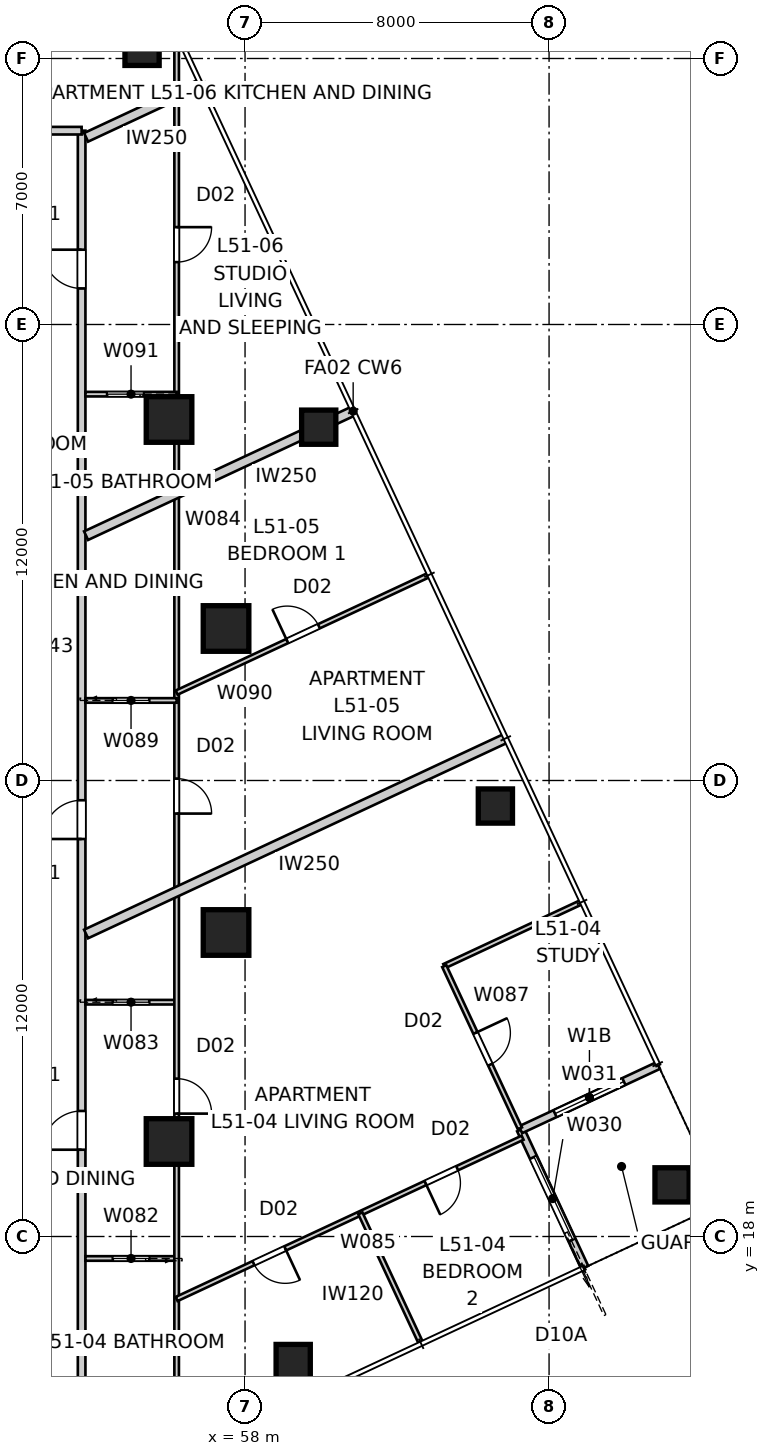
"""IFC4 building model, lengths in metres.
Left out: names, types, materials, properties, quantities, classifications, styles, units other than length and angle.
Written with IfcOpenShell. Run it as: python <this file> out.ifc"""

import sys

from ifc_helpers import new_model, si_unit, direction, frame, frame_2d, origin, origin_2d, place, context, subcontext, project, spatial, rectangle, extrude, element, fill, save


model = new_model("IFC4")
c1 = context("Model", 3, precision=1e-05, world=origin(), true_north=direction((0.0, 1.0)))
c2 = subcontext(c1, "Body", "Model", "MODEL_VIEW")
j1 = project(units=[si_unit("LENGTHUNIT", "METRE"), si_unit("PLANEANGLEUNIT", "RADIAN")], contexts=[c1])
p1 = place(None, origin())
s1 = spatial("IfcSite", under=j1, at=p1, CompositionType="ELEMENT")
p2 = place(p1, origin())
s2 = spatial("IfcBuilding", under=s1, at=p2, CompositionType="ELEMENT")
p3 = place(p2, frame((0.0, 0.0, 186.2)))
s3 = spatial("IfcBuildingStorey", under=s2, at=p3, CompositionType="ELEMENT", Elevation=186.2)
for number, where, z_axis, x_axis in (
    (1, (59.267, 14.71, 0.0), (0.0, 0.0, 1.0), (1.0, 0.0, 0.0)),
    (2, (69.236, 19.359, 0.0), (0.0, 0.0, 1.0), (1.0, 0.0, 0.0)),
    (3, (64.588, 29.328, 0.0), (0.0, 0.0, 1.0), (1.0, 0.0, 0.0)),
    (4, (59.939, 39.298, 0.0), (0.0, 0.0, 1.0), (1.0, 0.0, 0.0)),
    (5, (55.29, 49.267, 0.0), (0.0, 0.0, 1.0), (1.0, 0.0, 0.0)),
):
    element("IfcColumn", number, at=place(p3, frame(where, z_axis=z_axis, x_axis=x_axis)), inside=s3, PredefinedType="COLUMN", context=c2, shape_type="SweptSolid", body=[
        extrude(rectangle(XDim=0.9, YDim=0.9, at=origin_2d()), origin(), (0.0, 0.0, 1.0), 3.4),
    ])
for number, where, z_axis, x_axis in (
    (6, (57.5, 26.0, 0.0), (0.0, 0.0, 1.0), (1.0, 0.0, 0.0)),
    (7, (57.5, 34.0, 0.0), (0.0, 0.0, 1.0), (1.0, 0.0, 0.0)),
    (8, (56.0, 39.5, 0.0), (0.0, 0.0, 1.0), (1.0, 0.0, 0.0)),
    (9, (56.0, 20.5, 0.0), (0.0, 0.0, 1.0), (1.0, 0.0, 0.0)),
):
    element("IfcColumn", number, at=place(p3, frame(where, z_axis=z_axis, x_axis=x_axis)), inside=s3, PredefinedType="COLUMN", context=c2, shape_type="SweptSolid", body=[
        extrude(rectangle(XDim=1.2, YDim=1.2, at=origin_2d()), origin(), (0.0, 0.0, 1.0), 3.4),
    ])
p4 = place(p3, frame((66.94, 17.185, 0.0), z_axis=(0.0, 0.0, 1.0), x_axis=(-0.422658246362, 0.906289140828, 0.0)))
e10 = element("IfcWall", 10, at=p4, inside=s3, PredefinedType="SOLIDWALL", context=c2, shape_type="SweptSolid", body=[
    extrude(rectangle(XDim=4.0, YDim=0.2, at=frame_2d((2.0, 0.0))), origin(), (0.0, 0.0, 1.0), 3.25),
])
p5 = place(p4, frame((0.8, 0.0, 0.0)))
e11 = element("IfcOpeningElement", 11, at=p5, cuts=e10, PredefinedType="OPENING", context=c2, shape_type="SweptSolid", body=[
    extrude(rectangle(XDim=2.4, YDim=2.1, at=frame_2d((1.2, 1.05))), frame((0.0, 0.11, 0.0), z_axis=(0.0, -1.0, 0.0), x_axis=(1.0, 0.0, 0.0)), (0.0, 0.0, 1.0), 0.22),
])
p6 = place(p3, frame((65.25, 20.81, 0.0), z_axis=(0.0, 0.0, 1.0), x_axis=(0.906289140828, 0.422658246362, 0.0)))
e12 = element("IfcWall", 12, at=p6, inside=s3, PredefinedType="SOLIDWALL", context=c2, shape_type="SweptSolid", body=[
    extrude(rectangle(XDim=4.0, YDim=0.2, at=frame_2d((2.0, 0.0))), origin(), (0.0, 0.0, 1.0), 3.25),
])
p7 = place(p6, frame((1.0, 0.0, 0.45)))
e13 = element("IfcOpeningElement", 13, at=p7, cuts=e12, PredefinedType="OPENING", context=c2, shape_type="SweptSolid", body=[
    extrude(rectangle(XDim=2.0, YDim=1.8, at=frame_2d((1.0, 0.9))), frame((0.0, 0.11, 0.0), z_axis=(0.0, -1.0, 0.0), x_axis=(1.0, 0.0, 0.0)), (0.0, 0.0, 1.0), 0.22),
])
p8 = place(p3, frame((53.7, 13.3, 0.0), z_axis=(0.0, 0.0, 1.0), x_axis=(0.0, 1.0, 0.0)))
e14 = element("IfcWall", 14, at=p8, inside=s3, PredefinedType="PARTITIONING", context=c2, shape_type="SweptSolid", body=[
    extrude(rectangle(XDim=33.8, YDim=0.2, at=frame_2d((16.9, 0.0))), origin(), (0.0, 0.0, 1.0), 3.25),
])
p9 = place(p8, frame((6.984, 0.0, 0.0)))
e15 = element("IfcOpeningElement", 15, at=p9, cuts=e14, PredefinedType="OPENING", context=c2, shape_type="SweptSolid", body=[
    extrude(rectangle(XDim=1.02, YDim=2.34, at=frame_2d((0.51, 1.17))), frame((0.0, 0.11, 0.0), z_axis=(0.0, -1.0, 0.0), x_axis=(1.0, 0.0, 0.0)), (0.0, 0.0, 1.0), 0.22),
])
p10 = place(p8, frame((29.648, 0.0, 0.0)))
e16 = element("IfcOpeningElement", 16, at=p10, cuts=e14, PredefinedType="OPENING", context=c2, shape_type="SweptSolid", body=[
    extrude(rectangle(XDim=1.02, YDim=2.34, at=frame_2d((0.51, 1.17))), frame((0.0, 0.11, 0.0), z_axis=(0.0, -1.0, 0.0), x_axis=(1.0, 0.0, 0.0)), (0.0, 0.0, 1.0), 0.22),
])
p11 = place(p8, frame((15.16, 0.0, 0.0)))
e17 = element("IfcOpeningElement", 17, at=p11, cuts=e14, PredefinedType="OPENING", context=c2, shape_type="SweptSolid", body=[
    extrude(rectangle(XDim=1.02, YDim=2.34, at=frame_2d((0.51, 1.17))), frame((0.0, 0.11, 0.0), z_axis=(0.0, -1.0, 0.0), x_axis=(1.0, 0.0, 0.0)), (0.0, 0.0, 1.0), 0.22),
])
p12 = place(p3, frame((53.7, 47.1, 0.0), z_axis=(0.0, 0.0, 1.0), x_axis=(-1.0, 0.0, 0.0)))
e18 = element("IfcWall", 18, at=p12, inside=s3, PredefinedType="PARTITIONING", context=c2, shape_type="SweptSolid", body=[
    extrude(rectangle(XDim=7.392, YDim=0.2, at=frame_2d((3.696, 0.0))), origin(), (0.0, 0.0, 1.0), 3.25),
])
p13 = place(p12, frame((2.506, 0.0, 0.0)))
e19 = element("IfcOpeningElement", 19, at=p13, cuts=e18, PredefinedType="OPENING", context=c2, shape_type="SweptSolid", body=[
    extrude(rectangle(XDim=1.02, YDim=2.34, at=frame_2d((0.51, 1.17))), frame((0.0, 0.11, 0.0), z_axis=(0.0, -1.0, 0.0), x_axis=(1.0, 0.0, 0.0)), (0.0, 0.0, 1.0), 0.22),
])
p14 = place(p3, frame((60.845, 39.72, 0.0), z_axis=(0.0, 0.0, 1.0), x_axis=(-0.906308569177, -0.422616584432, 0.0)))
e20 = element("IfcWall", 20, at=p14, inside=s3, PredefinedType="PARTITIONING", context=c2, shape_type="SweptSolid", body=[
    extrude(rectangle(XDim=7.755, YDim=0.25, at=frame_2d((3.877, 0.0))), origin(), (0.0, 0.0, 1.0), 3.25),
])
p15 = place(p3, frame((64.86, 31.11, 0.0), z_axis=(0.0, 0.0, 1.0), x_axis=(-0.906303906082, -0.422626584374, 0.0)))
e21 = element("IfcWall", 21, at=p15, inside=s3, PredefinedType="PARTITIONING", context=c2, shape_type="SweptSolid", body=[
    extrude(rectangle(XDim=12.185, YDim=0.25, at=frame_2d((6.092, 0.0))), origin(), (0.0, 0.0, 1.0), 3.25),
])
p16 = place(p3, frame((56.83, 48.33, 0.0), z_axis=(0.0, 0.0, 1.0), x_axis=(-0.906310647924, -0.422612126495, 0.0)))
e22 = element("IfcWall", 22, at=p16, inside=s3, PredefinedType="PARTITIONING", context=c2, shape_type="SweptSolid", body=[
    extrude(rectangle(XDim=3.325, YDim=0.25, at=frame_2d((1.663, 0.0))), origin(), (0.0, 0.0, 1.0), 3.25),
])
p17 = place(p3, frame((56.2, 17.422, 0.0), z_axis=(0.0, 0.0, 1.0), x_axis=(-1.0, 0.0, 0.0)))
e23 = element("IfcWall", 23, at=p17, inside=s3, PredefinedType="PARTITIONING", context=c2, shape_type="SweptSolid", body=[
    extrude(rectangle(XDim=2.4, YDim=0.12, at=frame_2d((1.2, 0.0))), origin(), (0.0, 0.0, 1.0), 3.25),
])
p18 = place(p17, frame((0.72, 0.0, 0.0)))
e24 = element("IfcOpeningElement", 24, at=p18, cuts=e23, PredefinedType="OPENING", context=c2, shape_type="SweptSolid", body=[
    extrude(rectangle(XDim=0.96, YDim=2.1, at=frame_2d((0.48, 1.05))), frame((0.0, 0.07, 0.0), z_axis=(0.0, -1.0, 0.0), x_axis=(1.0, 0.0, 0.0)), (0.0, 0.0, 1.0), 0.14),
])
p19 = place(p3, frame((53.8, 24.166, 0.0), z_axis=(0.0, 0.0, 1.0), x_axis=(1.0, 0.0, 0.0)))
e25 = element("IfcWall", 25, at=p19, inside=s3, PredefinedType="PARTITIONING", context=c2, shape_type="SweptSolid", body=[
    extrude(rectangle(XDim=2.4, YDim=0.12, at=frame_2d((1.2, 0.0))), origin(), (0.0, 0.0, 1.0), 2.796),
])
p20 = place(p19, frame((0.72, 0.0, 0.0)))
e26 = element("IfcOpeningElement", 26, at=p20, cuts=e25, PredefinedType="OPENING", context=c2, shape_type="SweptSolid", body=[
    extrude(rectangle(XDim=0.96, YDim=2.1, at=frame_2d((0.48, 1.05))), frame((0.0, 0.07, 0.0), z_axis=(0.0, -1.0, 0.0), x_axis=(1.0, 0.0, 0.0)), (0.0, 0.0, 1.0), 0.14),
])
p21 = place(p3, frame((56.2, 49.642, 0.0), z_axis=(0.0, 0.0, 1.0), x_axis=(0.0, -1.0, 0.0)))
e27 = element("IfcWall", 27, at=p21, inside=s3, PredefinedType="PARTITIONING", context=c2, shape_type="SweptSolid", body=[
    extrude(rectangle(XDim=37.421, YDim=0.12, at=frame_2d((18.71, 0.0))), origin(), (0.0, 0.0, 1.0), 2.55),
])
p22 = place(p21, frame((27.488, 0.0, 0.0)))
e28 = element("IfcOpeningElement", 28, at=p22, cuts=e27, PredefinedType="OPENING", context=c2, shape_type="SweptSolid", body=[
    extrude(rectangle(XDim=0.92, YDim=2.34, at=frame_2d((0.46, 1.17))), frame((0.0, 0.07, 0.0), z_axis=(0.0, -1.0, 0.0), x_axis=(1.0, 0.0, 0.0)), (0.0, 0.0, 1.0), 0.14),
])
p23 = place(p21, frame((5.08, 0.0, 0.0)))
e29 = element("IfcOpeningElement", 29, at=p23, cuts=e27, PredefinedType="OPENING", context=c2, shape_type="SweptSolid", body=[
    extrude(rectangle(XDim=0.92, YDim=2.34, at=frame_2d((0.46, 1.17))), frame((0.0, 0.07, 0.0), z_axis=(0.0, -1.0, 0.0), x_axis=(1.0, 0.0, 0.0)), (0.0, 0.0, 1.0), 0.14),
])
p24 = place(p21, frame((19.592, 0.0, 0.0)))
e30 = element("IfcOpeningElement", 30, at=p24, cuts=e27, PredefinedType="OPENING", context=c2, shape_type="SweptSolid", body=[
    extrude(rectangle(XDim=0.92, YDim=2.34, at=frame_2d((0.46, 1.17))), frame((0.0, 0.07, 0.0), z_axis=(0.0, -1.0, 0.0), x_axis=(1.0, 0.0, 0.0)), (0.0, 0.0, 1.0), 0.14),
])
p25 = place(p3, frame((65.303, 20.6, 0.0), z_axis=(0.0, 0.0, 1.0), x_axis=(-0.906300466163, -0.422633961049, 0.0)))
e31 = element("IfcWall", 31, at=p25, inside=s3, PredefinedType="PARTITIONING", context=c2, shape_type="SweptSolid", body=[
    extrude(rectangle(XDim=10.044, YDim=0.12, at=frame_2d((5.022, 0.0))), origin(), (0.0, 0.0, 1.0), 3.25),
])
p26 = place(p25, frame((6.892, 0.0, 0.0)))
e32 = element("IfcOpeningElement", 32, at=p26, cuts=e31, PredefinedType="OPENING", context=c2, shape_type="SweptSolid", body=[
    extrude(rectangle(XDim=0.92, YDim=2.34, at=frame_2d((0.46, 1.17))), frame((0.0, 0.07, 0.0), z_axis=(0.0, -1.0, 0.0), x_axis=(1.0, 0.0, 0.0)), (0.0, 0.0, 1.0), 0.14),
])
p27 = place(p25, frame((1.9, 0.0, 0.0)))
e33 = element("IfcOpeningElement", 33, at=p27, cuts=e31, PredefinedType="OPENING", context=c2, shape_type="SweptSolid", body=[
    extrude(rectangle(XDim=0.92, YDim=2.34, at=frame_2d((0.46, 1.17))), frame((0.0, 0.07, 0.0), z_axis=(0.0, -1.0, 0.0), x_axis=(1.0, 0.0, 0.0)), (0.0, 0.0, 1.0), 0.14),
])
p28 = place(p3, frame((66.831, 26.789, 0.0), z_axis=(0.0, 0.0, 1.0), x_axis=(-0.906277619727, -0.422682949718, 0.0)))
e34 = element("IfcWall", 34, at=p28, inside=s3, PredefinedType="PARTITIONING", context=c2, shape_type="SweptSolid", body=[
    extrude(rectangle(XDim=3.96, YDim=0.12, at=frame_2d((1.98, 0.0))), origin(), (0.0, 0.0, 1.0), 3.25),
])
p29 = place(p3, frame((63.242, 25.115, 0.0), z_axis=(0.0, 0.0, 1.0), x_axis=(0.422621536194, -0.906306260127, 0.0)))
e35 = element("IfcWall", 35, at=p29, inside=s3, PredefinedType="PARTITIONING", context=c2, shape_type="SweptSolid", body=[
    extrude(rectangle(XDim=4.71, YDim=0.12, at=frame_2d((2.355, 0.0))), origin(), (0.0, 0.0, 1.0), 3.25),
])
p30 = place(p29, frame((1.94, 0.0, 0.0)))
e36 = element("IfcOpeningElement", 36, at=p30, cuts=e35, PredefinedType="OPENING", context=c2, shape_type="SweptSolid", body=[
    extrude(rectangle(XDim=0.92, YDim=2.34, at=frame_2d((0.46, 1.17))), frame((0.0, 0.07, 0.0), z_axis=(0.0, -1.0, 0.0), x_axis=(1.0, 0.0, 0.0)), (0.0, 0.0, 1.0), 0.14),
])
p31 = place(p3, frame((61.035, 18.609, 0.0), z_axis=(0.0, 0.0, 1.0), x_axis=(0.422600090785, -0.906316260071, 0.0)))
e37 = element("IfcWall", 37, at=p31, inside=s3, PredefinedType="PARTITIONING", context=c2, shape_type="SweptSolid", body=[
    extrude(rectangle(XDim=3.747, YDim=0.12, at=frame_2d((1.874, 0.0))), origin(), (0.0, 0.0, 1.0), 3.25),
])
p32 = place(p3, frame((53.8, 32.107, 0.0), z_axis=(0.0, 0.0, 1.0), x_axis=(1.0, 0.0, 0.0)))
e38 = element("IfcWall", 38, at=p32, inside=s3, PredefinedType="PARTITIONING", context=c2, shape_type="SweptSolid", body=[
    extrude(rectangle(XDim=2.4, YDim=0.12, at=frame_2d((1.2, 0.0))), origin(), (0.0, 0.0, 1.0), 3.25),
])
p33 = place(p32, frame((0.72, 0.0, 0.0)))
e39 = element("IfcOpeningElement", 39, at=p33, cuts=e38, PredefinedType="OPENING", context=c2, shape_type="SweptSolid", body=[
    extrude(rectangle(XDim=0.96, YDim=2.1, at=frame_2d((0.48, 1.05))), frame((0.0, 0.07, 0.0), z_axis=(0.0, -1.0, 0.0), x_axis=(1.0, 0.0, 0.0)), (0.0, 0.0, 1.0), 0.14),
])
p34 = place(p3, frame((56.2, 32.313, 0.0), z_axis=(0.0, 0.0, 1.0), x_axis=(0.906306986906, 0.422619977621, 0.0)))
e40 = element("IfcWall", 40, at=p34, inside=s3, PredefinedType="PARTITIONING", context=c2, shape_type="SweptSolid", body=[
    extrude(rectangle(XDim=7.3, YDim=0.12, at=frame_2d((3.65, 0.0))), origin(), (0.0, 0.0, 1.0), 3.25),
])
p35 = place(p34, frame((3.21, 0.0, 0.0)))
e41 = element("IfcOpeningElement", 41, at=p35, cuts=e40, PredefinedType="OPENING", context=c2, shape_type="SweptSolid", body=[
    extrude(rectangle(XDim=0.92, YDim=2.34, at=frame_2d((0.46, 1.17))), frame((0.0, 0.07, 0.0), z_axis=(0.0, -1.0, 0.0), x_axis=(1.0, 0.0, 0.0)), (0.0, 0.0, 1.0), 0.14),
])
p36 = place(p3, frame((56.2, 40.167, 0.0), z_axis=(0.0, 0.0, 1.0), x_axis=(-1.0, 0.0, 0.0)))
e42 = element("IfcWall", 42, at=p36, inside=s3, PredefinedType="PARTITIONING", context=c2, shape_type="SweptSolid", body=[
    extrude(rectangle(XDim=2.4, YDim=0.12, at=frame_2d((1.2, 0.0))), origin(), (0.0, 0.0, 1.0), 3.25),
])
p37 = place(p36, frame((0.87, 0.0, 0.0)))
e43 = element("IfcOpeningElement", 43, at=p37, cuts=e42, PredefinedType="OPENING", context=c2, shape_type="SweptSolid", body=[
    extrude(rectangle(XDim=0.96, YDim=2.1, at=frame_2d((0.48, 1.05))), frame((0.0, 0.07, 0.0), z_axis=(0.0, -1.0, 0.0), x_axis=(1.0, 0.0, 0.0)), (0.0, 0.0, 1.0), 0.14),
])
p38 = place(p5, origin())
e44 = element("IfcDoor", 44, at=p38, inside=s3, OperationType="SLIDING_TO_LEFT", PredefinedType="DOOR", context=c2, shape_type="SweptSolid", body=[
    extrude(rectangle(XDim=2.4, YDim=2.1, at=frame_2d((1.2, 1.05))), frame((0.0, 0.025, 0.0), z_axis=(0.0, -1.0, 0.0), x_axis=(1.0, 0.0, 0.0)), (0.0, 0.0, 1.0), 0.05),
])
fill(e11, e44)
p39 = place(p7, origin())
e45 = element("IfcWindow", 45, at=p39, inside=s3, PartitioningType="SINGLE_PANEL", PredefinedType="WINDOW", context=c2, shape_type="SweptSolid", body=[
    extrude(rectangle(XDim=2.0, YDim=1.8, at=frame_2d((1.0, 0.9))), frame((0.0, 0.03, 0.0), z_axis=(0.0, -1.0, 0.0), x_axis=(1.0, 0.0, 0.0)), (0.0, 0.0, 1.0), 0.06),
])
fill(e13, e45)
p40 = place(p9, origin())
e46 = element("IfcDoor", 46, at=p40, inside=s3, OperationType="SINGLE_SWING_LEFT", PredefinedType="DOOR", context=c2, shape_type="SweptSolid", body=[
    extrude(rectangle(XDim=1.02, YDim=2.34, at=frame_2d((0.51, 1.17))), frame((0.0, 0.025, 0.0), z_axis=(0.0, -1.0, 0.0), x_axis=(1.0, 0.0, 0.0)), (0.0, 0.0, 1.0), 0.05),
])
fill(e15, e46)
p41 = place(p10, origin())
e47 = element("IfcDoor", 47, at=p41, inside=s3, OperationType="SINGLE_SWING_RIGHT", PredefinedType="DOOR", context=c2, shape_type="SweptSolid", body=[
    extrude(rectangle(XDim=1.02, YDim=2.34, at=frame_2d((0.51, 1.17))), frame((0.0, 0.025, 0.0), z_axis=(0.0, -1.0, 0.0), x_axis=(1.0, 0.0, 0.0)), (0.0, 0.0, 1.0), 0.05),
])
fill(e16, e47)
p42 = place(p11, origin())
e48 = element("IfcDoor", 48, at=p42, inside=s3, OperationType="SINGLE_SWING_LEFT", PredefinedType="DOOR", context=c2, shape_type="SweptSolid", body=[
    extrude(rectangle(XDim=1.02, YDim=2.34, at=frame_2d((0.51, 1.17))), frame((0.0, 0.025, 0.0), z_axis=(0.0, -1.0, 0.0), x_axis=(1.0, 0.0, 0.0)), (0.0, 0.0, 1.0), 0.05),
])
fill(e17, e48)
p43 = place(p22, origin())
e49 = element("IfcDoor", 49, at=p43, inside=s3, OperationType="SINGLE_SWING_RIGHT", PredefinedType="DOOR", context=c2, shape_type="SweptSolid", body=[
    extrude(rectangle(XDim=0.92, YDim=2.34, at=frame_2d((0.46, 1.17))), frame((0.0, 0.025, 0.0), z_axis=(0.0, -1.0, 0.0), x_axis=(1.0, 0.0, 0.0)), (0.0, 0.0, 1.0), 0.05),
])
fill(e28, e49)
p44 = place(p18, origin())
e50 = element("IfcDoor", 50, at=p44, inside=s3, OperationType="SLIDING_TO_LEFT", PredefinedType="DOOR", context=c2, shape_type="SweptSolid", body=[
    extrude(rectangle(XDim=0.96, YDim=2.1, at=frame_2d((0.48, 1.05))), frame((0.0, 0.025, 0.0), z_axis=(0.0, -1.0, 0.0), x_axis=(1.0, 0.0, 0.0)), (0.0, 0.0, 1.0), 0.05),
])
fill(e24, e50)
p45 = place(p20, origin())
e51 = element("IfcDoor", 51, at=p45, inside=s3, OperationType="SLIDING_TO_LEFT", PredefinedType="DOOR", context=c2, shape_type="SweptSolid", body=[
    extrude(rectangle(XDim=0.96, YDim=2.1, at=frame_2d((0.48, 1.05))), frame((0.0, 0.025, 0.0), z_axis=(0.0, -1.0, 0.0), x_axis=(1.0, 0.0, 0.0)), (0.0, 0.0, 1.0), 0.05),
])
fill(e26, e51)
p46 = place(p23, origin())
e52 = element("IfcDoor", 52, at=p46, inside=s3, OperationType="SINGLE_SWING_LEFT", PredefinedType="DOOR", context=c2, shape_type="SweptSolid", body=[
    extrude(rectangle(XDim=0.92, YDim=2.34, at=frame_2d((0.46, 1.17))), frame((0.0, 0.025, 0.0), z_axis=(0.0, -1.0, 0.0), x_axis=(1.0, 0.0, 0.0)), (0.0, 0.0, 1.0), 0.05),
])
fill(e29, e52)
p47 = place(p37, origin())
e53 = element("IfcDoor", 53, at=p47, inside=s3, OperationType="SLIDING_TO_LEFT", PredefinedType="DOOR", context=c2, shape_type="SweptSolid", body=[
    extrude(rectangle(XDim=0.96, YDim=2.1, at=frame_2d((0.48, 1.05))), frame((0.0, 0.025, 0.0), z_axis=(0.0, -1.0, 0.0), x_axis=(1.0, 0.0, 0.0)), (0.0, 0.0, 1.0), 0.05),
])
fill(e43, e53)
p48 = place(p24, origin())
e54 = element("IfcDoor", 54, at=p48, inside=s3, OperationType="SINGLE_SWING_RIGHT", PredefinedType="DOOR", context=c2, shape_type="SweptSolid", body=[
    extrude(rectangle(XDim=0.92, YDim=2.34, at=frame_2d((0.46, 1.17))), frame((0.0, 0.025, 0.0), z_axis=(0.0, -1.0, 0.0), x_axis=(1.0, 0.0, 0.0)), (0.0, 0.0, 1.0), 0.05),
])
fill(e30, e54)
p49 = place(p33, origin())
e55 = element("IfcDoor", 55, at=p49, inside=s3, OperationType="SLIDING_TO_LEFT", PredefinedType="DOOR", context=c2, shape_type="SweptSolid", body=[
    extrude(rectangle(XDim=0.96, YDim=2.1, at=frame_2d((0.48, 1.05))), frame((0.0, 0.025, 0.0), z_axis=(0.0, -1.0, 0.0), x_axis=(1.0, 0.0, 0.0)), (0.0, 0.0, 1.0), 0.05),
])
fill(e39, e55)
p50 = place(p26, origin())
e56 = element("IfcDoor", 56, at=p50, inside=s3, OperationType="SINGLE_SWING_LEFT", PredefinedType="DOOR", context=c2, shape_type="SweptSolid", body=[
    extrude(rectangle(XDim=0.92, YDim=2.34, at=frame_2d((0.46, 1.17))), frame((0.0, 0.025, 0.0), z_axis=(0.0, -1.0, 0.0), x_axis=(1.0, 0.0, 0.0)), (0.0, 0.0, 1.0), 0.05),
])
fill(e32, e56)
p51 = place(p27, origin())
e57 = element("IfcDoor", 57, at=p51, inside=s3, OperationType="SINGLE_SWING_RIGHT", PredefinedType="DOOR", context=c2, shape_type="SweptSolid", body=[
    extrude(rectangle(XDim=0.92, YDim=2.34, at=frame_2d((0.46, 1.17))), frame((0.0, 0.025, 0.0), z_axis=(0.0, -1.0, 0.0), x_axis=(1.0, 0.0, 0.0)), (0.0, 0.0, 1.0), 0.05),
])
fill(e33, e57)
p52 = place(p30, origin())
e58 = element("IfcDoor", 58, at=p52, inside=s3, OperationType="SINGLE_SWING_LEFT", PredefinedType="DOOR", context=c2, shape_type="SweptSolid", body=[
    extrude(rectangle(XDim=0.92, YDim=2.34, at=frame_2d((0.46, 1.17))), frame((0.0, 0.025, 0.0), z_axis=(0.0, -1.0, 0.0), x_axis=(1.0, 0.0, 0.0)), (0.0, 0.0, 1.0), 0.05),
])
fill(e36, e58)
p53 = place(p35, origin())
e59 = element("IfcDoor", 59, at=p53, inside=s3, OperationType="SINGLE_SWING_LEFT", PredefinedType="DOOR", context=c2, shape_type="SweptSolid", body=[
    extrude(rectangle(XDim=0.92, YDim=2.34, at=frame_2d((0.46, 1.17))), frame((0.0, 0.025, 0.0), z_axis=(0.0, -1.0, 0.0), x_axis=(1.0, 0.0, 0.0)), (0.0, 0.0, 1.0), 0.05),
])
fill(e41, e59)
save(model, sys.argv[1])
